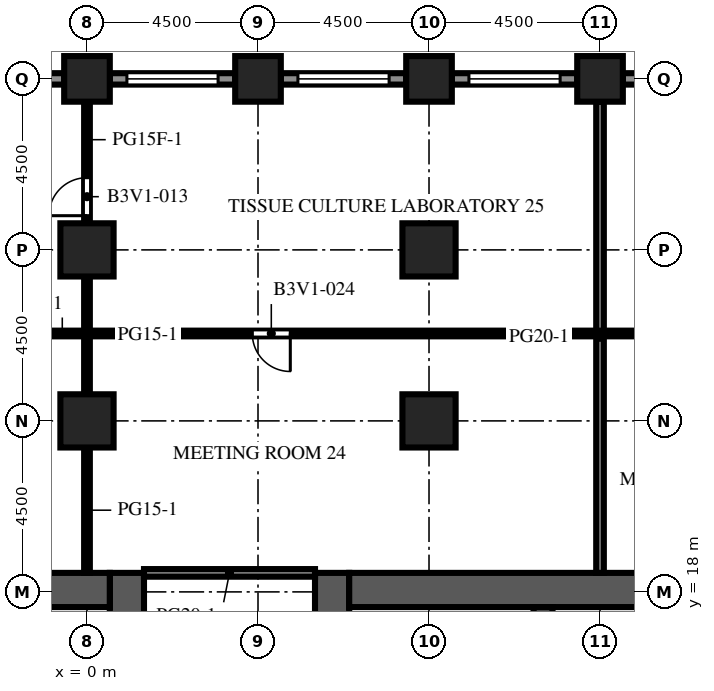
"""IFC4 building model, lengths in metres.
Left out: names, types, materials, properties, quantities, classifications, styles, units other than length and angle.
Written with IfcOpenShell. Run it as: python <this file> out.ifc"""

import sys

from ifc_helpers import new_model, si_unit, direction, frame, frame_2d, origin, origin_2d, place, context, subcontext, project, spatial, rectangle, extrude, element, fill, save


model = new_model("IFC4")
c1 = context("Model", 3, precision=1e-05, world=origin(), true_north=direction((0.0, 1.0)))
c2 = subcontext(c1, "Body", "Model", "MODEL_VIEW")
j1 = project(units=[si_unit("LENGTHUNIT", "METRE"), si_unit("PLANEANGLEUNIT", "RADIAN")], contexts=[c1])
p1 = place(None, origin())
s1 = spatial("IfcSite", under=j1, at=p1, CompositionType="ELEMENT")
p2 = place(p1, origin())
s2 = spatial("IfcBuilding", under=s1, at=p2, CompositionType="ELEMENT")
p3 = place(p2, frame((0.0, 0.0, 94.3)))
s3 = spatial("IfcBuildingStorey", under=s2, at=p3, CompositionType="ELEMENT", Elevation=94.3)
for number, where, z_axis, x_axis in (
    (1, (0.0, 31.5, 0.0), (0.0, 0.0, 1.0), (1.0, 0.0, 0.0)),
    (2, (4.5, 31.5, 0.0), (0.0, 0.0, 1.0), (1.0, 0.0, 0.0)),
    (3, (9.0, 31.5, 0.0), (0.0, 0.0, 1.0), (1.0, 0.0, 0.0)),
    (4, (13.5, 31.5, 0.0), (0.0, 0.0, 1.0), (1.0, 0.0, 0.0)),
):
    element("IfcColumn", number, at=place(p3, frame(where, z_axis=z_axis, x_axis=x_axis)), inside=s3, PredefinedType="COLUMN", context=c2, shape_type="SweptSolid", body=[
        extrude(rectangle(XDim=1.2, YDim=1.2, at=origin_2d()), origin(), (0.0, 0.0, 1.0), 4.1),
    ])
for number, where, z_axis, x_axis in (
    (5, (0.0, 22.5, 0.0), (0.0, 0.0, 1.0), (1.0, 0.0, 0.0)),
    (6, (0.0, 27.0, 0.0), (0.0, 0.0, 1.0), (1.0, 0.0, 0.0)),
    (7, (9.0, 22.5, 0.0), (0.0, 0.0, 1.0), (1.0, 0.0, 0.0)),
    (8, (9.0, 27.0, 0.0), (0.0, 0.0, 1.0), (1.0, 0.0, 0.0)),
):
    element("IfcColumn", number, at=place(p3, frame(where, z_axis=z_axis, x_axis=x_axis)), inside=s3, PredefinedType="COLUMN", context=c2, shape_type="SweptSolid", body=[
        extrude(rectangle(XDim=1.4, YDim=1.4, at=origin_2d()), origin(), (0.0, 0.0, 1.0), 4.1),
    ])
p4 = place(p3, frame((1.05, -9.0, 0.0), z_axis=(0.0, 0.0, 1.0), x_axis=(0.0, 1.0, 0.0)))
e9 = element("IfcWall", 9, at=p4, inside=s3, PredefinedType="SHEAR", context=c2, shape_type="SweptSolid", body=[
    extrude(rectangle(XDim=27.5, YDim=0.9, at=frame_2d((13.75, 0.0))), origin(), (0.0, 0.0, 1.0), 4.1),
])
p5 = place(p4, frame((12.55, 0.0, 0.0)))
e10 = element("IfcOpeningElement", 10, at=p5, cuts=e9, PredefinedType="OPENING", context=c2, shape_type="SweptSolid", body=[
    extrude(rectangle(XDim=2.4, YDim=2.4, at=frame_2d((1.2, 1.2))), frame((0.0, 0.46, 0.0), z_axis=(0.0, -1.0, 0.0), x_axis=(1.0, 0.0, 0.0)), (0.0, 0.0, 1.0), 0.92),
])
p6 = place(p4, frame((3.975, 0.0, 0.0)))
e11 = element("IfcOpeningElement", 11, at=p6, cuts=e9, PredefinedType="OPENING", context=c2, shape_type="SweptSolid", body=[
    extrude(rectangle(XDim=1.2, YDim=2.1, at=frame_2d((0.6, 1.05))), frame((0.0, 0.46, 0.0), z_axis=(0.0, -1.0, 0.0), x_axis=(1.0, 0.0, 0.0)), (0.0, 0.0, 1.0), 0.92),
])
p7 = place(p4, frame((22.325, 0.0, 0.0)))
e12 = element("IfcOpeningElement", 12, at=p7, cuts=e9, PredefinedType="OPENING", context=c2, shape_type="SweptSolid", body=[
    extrude(rectangle(XDim=1.2, YDim=2.1, at=frame_2d((0.6, 1.05))), frame((0.0, 0.46, 0.0), z_axis=(0.0, -1.0, 0.0), x_axis=(1.0, 0.0, 0.0)), (0.0, 0.0, 1.0), 0.92),
])
p8 = place(p3, frame((-9.6, 18.05, 0.0), z_axis=(0.0, 0.0, 1.0), x_axis=(1.0, 0.0, 0.0)))
e13 = element("IfcWall", 13, at=p8, inside=s3, PredefinedType="SHEAR", context=c2, shape_type="SweptSolid", body=[
    extrude(rectangle(XDim=10.2, YDim=0.9, at=frame_2d((5.1, 0.0))), origin(), (0.0, 0.0, 1.0), 4.1),
])
p9 = place(p3, frame((6.45, -9.0, 0.0), z_axis=(0.0, 0.0, 1.0), x_axis=(0.0, 1.0, 0.0)))
e14 = element("IfcWall", 14, at=p9, inside=s3, PredefinedType="SHEAR", context=c2, shape_type="SweptSolid", body=[
    extrude(rectangle(XDim=27.5, YDim=0.9, at=frame_2d((13.75, 0.0))), origin(), (0.0, 0.0, 1.0), 4.1),
])
p10 = place(p9, frame((12.55, 0.0, 0.0)))
e15 = element("IfcOpeningElement", 15, at=p10, cuts=e14, PredefinedType="OPENING", context=c2, shape_type="SweptSolid", body=[
    extrude(rectangle(XDim=2.4, YDim=2.4, at=frame_2d((1.2, 1.2))), frame((0.0, 0.46, 0.0), z_axis=(0.0, -1.0, 0.0), x_axis=(1.0, 0.0, 0.0)), (0.0, 0.0, 1.0), 0.92),
])
p11 = place(p9, frame((3.975, 0.0, 0.0)))
e16 = element("IfcOpeningElement", 16, at=p11, cuts=e14, PredefinedType="OPENING", context=c2, shape_type="SweptSolid", body=[
    extrude(rectangle(XDim=1.2, YDim=2.1, at=frame_2d((0.6, 1.05))), frame((0.0, 0.46, 0.0), z_axis=(0.0, -1.0, 0.0), x_axis=(1.0, 0.0, 0.0)), (0.0, 0.0, 1.0), 0.92),
])
p12 = place(p9, frame((22.325, 0.0, 0.0)))
e17 = element("IfcOpeningElement", 17, at=p12, cuts=e14, PredefinedType="OPENING", context=c2, shape_type="SweptSolid", body=[
    extrude(rectangle(XDim=1.2, YDim=2.1, at=frame_2d((0.6, 1.05))), frame((0.0, 0.46, 0.0), z_axis=(0.0, -1.0, 0.0), x_axis=(1.0, 0.0, 0.0)), (0.0, 0.0, 1.0), 0.92),
])
p13 = place(p3, frame((6.9, 18.05, 0.0), z_axis=(0.0, 0.0, 1.0), x_axis=(1.0, 0.0, 0.0)))
e18 = element("IfcWall", 18, at=p13, inside=s3, PredefinedType="SHEAR", context=c2, shape_type="SweptSolid", body=[
    extrude(rectangle(XDim=10.2, YDim=0.9, at=frame_2d((5.1, 0.0))), origin(), (0.0, 0.0, 1.0), 4.1),
])
p14 = place(p3, frame((12.0, 10.25, 0.0), z_axis=(0.0, 0.0, 1.0), x_axis=(0.0, 1.0, 0.0)))
e19 = element("IfcWall", 19, at=p14, inside=s3, PredefinedType="SHEAR", context=c2, shape_type="SweptSolid", body=[
    extrude(rectangle(XDim=7.35, YDim=0.5, at=frame_2d((3.675, 0.0))), origin(), (0.0, 0.0, 1.0), 4.1),
])
p15 = place(p3, frame((14.1, 31.5, 0.0), z_axis=(0.0, 0.0, 1.0), x_axis=(1.0, 0.0, 0.0)))
e20 = element("IfcWall", 20, at=p15, inside=s3, PredefinedType="SOLIDWALL", context=c2, shape_type="SweptSolid", body=[
    extrude(rectangle(XDim=3.3, YDim=0.3, at=frame_2d((1.65, 0.0))), origin(), (0.0, 0.0, 1.0), 2.75),
])
p16 = place(p15, frame((0.45, 0.0, 0.8)))
e21 = element("IfcOpeningElement", 21, at=p16, cuts=e20, PredefinedType="OPENING", context=c2, shape_type="SweptSolid", body=[
    extrude(rectangle(XDim=2.4, YDim=1.7, at=frame_2d((1.2, 0.85))), frame((0.0, 0.16, 0.0), z_axis=(0.0, -1.0, 0.0), x_axis=(1.0, 0.0, 0.0)), (0.0, 0.0, 1.0), 0.32),
])
p17 = place(p3, frame((9.6, 31.5, 0.0), z_axis=(0.0, 0.0, 1.0), x_axis=(1.0, 0.0, 0.0)))
e22 = element("IfcWall", 22, at=p17, inside=s3, PredefinedType="SOLIDWALL", context=c2, shape_type="SweptSolid", body=[
    extrude(rectangle(XDim=3.3, YDim=0.3, at=frame_2d((1.65, 0.0))), origin(), (0.0, 0.0, 1.0), 2.75),
])
p18 = place(p17, frame((0.45, 0.0, 0.8)))
e23 = element("IfcOpeningElement", 23, at=p18, cuts=e22, PredefinedType="OPENING", context=c2, shape_type="SweptSolid", body=[
    extrude(rectangle(XDim=2.4, YDim=1.7, at=frame_2d((1.2, 0.85))), frame((0.0, 0.16, 0.0), z_axis=(0.0, -1.0, 0.0), x_axis=(1.0, 0.0, 0.0)), (0.0, 0.0, 1.0), 0.32),
])
p19 = place(p3, frame((5.1, 31.5, 0.0), z_axis=(0.0, 0.0, 1.0), x_axis=(1.0, 0.0, 0.0)))
e24 = element("IfcWall", 24, at=p19, inside=s3, PredefinedType="SOLIDWALL", context=c2, shape_type="SweptSolid", body=[
    extrude(rectangle(XDim=3.3, YDim=0.3, at=frame_2d((1.65, 0.0))), origin(), (0.0, 0.0, 1.0), 2.75),
])
p20 = place(p19, frame((0.45, 0.0, 0.8)))
e25 = element("IfcOpeningElement", 25, at=p20, cuts=e24, PredefinedType="OPENING", context=c2, shape_type="SweptSolid", body=[
    extrude(rectangle(XDim=2.4, YDim=1.7, at=frame_2d((1.2, 0.85))), frame((0.0, 0.16, 0.0), z_axis=(0.0, -1.0, 0.0), x_axis=(1.0, 0.0, 0.0)), (0.0, 0.0, 1.0), 0.32),
])
p21 = place(p3, frame((0.6, 31.5, 0.0), z_axis=(0.0, 0.0, 1.0), x_axis=(1.0, 0.0, 0.0)))
e26 = element("IfcWall", 26, at=p21, inside=s3, PredefinedType="SOLIDWALL", context=c2, shape_type="SweptSolid", body=[
    extrude(rectangle(XDim=3.3, YDim=0.3, at=frame_2d((1.65, 0.0))), origin(), (0.0, 0.0, 1.0), 2.75),
])
p22 = place(p21, frame((0.45, 0.0, 0.8)))
e27 = element("IfcOpeningElement", 27, at=p22, cuts=e26, PredefinedType="OPENING", context=c2, shape_type="SweptSolid", body=[
    extrude(rectangle(XDim=2.4, YDim=1.7, at=frame_2d((1.2, 0.85))), frame((0.0, 0.16, 0.0), z_axis=(0.0, -1.0, 0.0), x_axis=(1.0, 0.0, 0.0)), (0.0, 0.0, 1.0), 0.32),
])
p23 = place(p3, frame((-3.9, 31.5, 0.0), z_axis=(0.0, 0.0, 1.0), x_axis=(1.0, 0.0, 0.0)))
e28 = element("IfcWall", 28, at=p23, inside=s3, PredefinedType="SOLIDWALL", context=c2, shape_type="SweptSolid", body=[
    extrude(rectangle(XDim=3.3, YDim=0.3, at=frame_2d((1.65, 0.0))), origin(), (0.0, 0.0, 1.0), 2.75),
])
p24 = place(p23, frame((0.45, 0.0, 0.8)))
e29 = element("IfcOpeningElement", 29, at=p24, cuts=e28, PredefinedType="OPENING", context=c2, shape_type="SweptSolid", body=[
    extrude(rectangle(XDim=2.4, YDim=1.7, at=frame_2d((1.2, 0.85))), frame((0.0, 0.16, 0.0), z_axis=(0.0, -1.0, 0.0), x_axis=(1.0, 0.0, 0.0)), (0.0, 0.0, 1.0), 0.32),
])
p25 = place(p3, frame((-0.8, 14.807, 0.0), z_axis=(0.0, 0.0, 1.0), x_axis=(0.0, 1.0, 0.0)))
e30 = element("IfcWall", 30, at=p25, inside=s3, PredefinedType="PARTITIONING", context=c2, shape_type="SweptSolid", body=[
    extrude(rectangle(XDim=2.793, YDim=0.1, at=frame_2d((1.396, 0.0))), origin(), (0.0, 0.0, 1.0), 3.65),
])
p26 = place(p25, frame((0.896, 0.0, 0.0)))
e31 = element("IfcOpeningElement", 31, at=p26, cuts=e30, PredefinedType="OPENING", context=c2, shape_type="SweptSolid", body=[
    extrude(rectangle(XDim=1.0, YDim=2.1, at=frame_2d((0.5, 1.05))), frame((0.0, 0.06, 0.0), z_axis=(0.0, -1.0, 0.0), x_axis=(1.0, 0.0, 0.0)), (0.0, 0.0, 1.0), 0.12),
])
p27 = place(p3, frame((8.3, 14.807, 0.0), z_axis=(0.0, 0.0, 1.0), x_axis=(0.0, 1.0, 0.0)))
e32 = element("IfcWall", 32, at=p27, inside=s3, PredefinedType="PARTITIONING", context=c2, shape_type="SweptSolid", body=[
    extrude(rectangle(XDim=2.793, YDim=0.1, at=frame_2d((1.396, 0.0))), origin(), (0.0, 0.0, 1.0), 3.65),
])
p28 = place(p27, frame((0.896, 0.0, 0.0)))
e33 = element("IfcOpeningElement", 33, at=p28, cuts=e32, PredefinedType="OPENING", context=c2, shape_type="SweptSolid", body=[
    extrude(rectangle(XDim=1.0, YDim=2.1, at=frame_2d((0.5, 1.05))), frame((0.0, 0.06, 0.0), z_axis=(0.0, -1.0, 0.0), x_axis=(1.0, 0.0, 0.0)), (0.0, 0.0, 1.0), 0.12),
])
p29 = place(p3, frame((0.0, 18.5, 0.0), z_axis=(0.0, 0.0, 1.0), x_axis=(0.0, 1.0, 0.0)))
e34 = element("IfcWall", 34, at=p29, inside=s3, PredefinedType="PARTITIONING", context=c2, shape_type="SweptSolid", body=[
    extrude(rectangle(XDim=3.3, YDim=0.15, at=frame_2d((1.65, 0.0))), origin(), (0.0, 0.0, 1.0), 3.65),
])
p30 = place(p3, frame((0.0, 23.2, 0.0), z_axis=(0.0, 0.0, 1.0), x_axis=(0.0, 1.0, 0.0)))
e35 = element("IfcWall", 35, at=p30, inside=s3, PredefinedType="PARTITIONING", context=c2, shape_type="SweptSolid", body=[
    extrude(rectangle(XDim=3.1, YDim=0.15, at=frame_2d((1.55, 0.0))), origin(), (0.0, 0.0, 1.0), 3.65),
])
p31 = place(p3, frame((0.0, 30.9, 0.0), z_axis=(0.0, 0.0, 1.0), x_axis=(0.0, -1.0, 0.0)))
e36 = element("IfcWall", 36, at=p31, inside=s3, PredefinedType="PARTITIONING", context=c2, shape_type="SweptSolid", body=[
    extrude(rectangle(XDim=3.2, YDim=0.15, at=frame_2d((1.6, 0.0))), origin(), (0.0, 0.0, 1.0), 3.65),
])
p32 = place(p31, frame((2.0, 0.0, 0.0)))
e37 = element("IfcOpeningElement", 37, at=p32, cuts=e36, PredefinedType="OPENING", context=c2, shape_type="SweptSolid", body=[
    extrude(rectangle(XDim=1.0, YDim=2.1, at=frame_2d((0.5, 1.05))), frame((0.0, 0.085, 0.0), z_axis=(0.0, -1.0, 0.0), x_axis=(1.0, 0.0, 0.0)), (0.0, 0.0, 1.0), 0.17),
])
p33 = place(p3, frame((13.5, 18.5, 0.0), z_axis=(0.0, 0.0, 1.0), x_axis=(0.0, 1.0, 0.0)))
e38 = element("IfcWall", 38, at=p33, inside=s3, PredefinedType="PARTITIONING", context=c2, shape_type="SweptSolid", body=[
    extrude(rectangle(XDim=12.4, YDim=0.2, at=frame_2d((6.2, 0.0))), origin(), (0.0, 0.0, 1.0), 3.65),
])
p34 = place(p3, frame((1.5, 18.5, 0.0), z_axis=(0.0, 0.0, 1.0), x_axis=(1.0, 0.0, 0.0)))
e39 = element("IfcWall", 39, at=p34, inside=s3, PredefinedType="PARTITIONING", context=c2, shape_type="SweptSolid", body=[
    extrude(rectangle(XDim=4.5, YDim=0.2, at=frame_2d((2.25, 0.0))), origin(), (0.0, 0.0, 1.0), 3.65),
])
p35 = place(p3, frame((18.0, 24.8, 0.0), z_axis=(0.0, 0.0, 1.0), x_axis=(-1.0, 0.0, 0.0)))
e40 = element("IfcWall", 40, at=p35, inside=s3, PredefinedType="PARTITIONING", context=c2, shape_type="SweptSolid", body=[
    extrude(rectangle(XDim=28.5, YDim=0.15, at=frame_2d((14.25, 0.0))), origin(), (0.0, 0.0, 1.0), 3.65),
])
p36 = place(p35, frame((23.65, 0.0, 0.0)))
e41 = element("IfcOpeningElement", 41, at=p36, cuts=e40, PredefinedType="OPENING", context=c2, shape_type="SweptSolid", body=[
    extrude(rectangle(XDim=1.0, YDim=2.1, at=frame_2d((0.5, 1.05))), frame((0.0, 0.085, 0.0), z_axis=(0.0, -1.0, 0.0), x_axis=(1.0, 0.0, 0.0)), (0.0, 0.0, 1.0), 0.17),
])
p37 = place(p35, frame((12.65, 0.0, 0.0)))
e42 = element("IfcOpeningElement", 42, at=p37, cuts=e40, PredefinedType="OPENING", context=c2, shape_type="SweptSolid", body=[
    extrude(rectangle(XDim=1.0, YDim=2.1, at=frame_2d((0.5, 1.05))), frame((0.0, 0.085, 0.0), z_axis=(0.0, -1.0, 0.0), x_axis=(1.0, 0.0, 0.0)), (0.0, 0.0, 1.0), 0.17),
])
p38 = place(p35, frame((1.9, 0.0, 0.0)))
e43 = element("IfcOpeningElement", 43, at=p38, cuts=e40, PredefinedType="OPENING", context=c2, shape_type="SweptSolid", body=[
    extrude(rectangle(XDim=1.0, YDim=2.1, at=frame_2d((0.5, 1.05))), frame((0.0, 0.085, 0.0), z_axis=(0.0, -1.0, 0.0), x_axis=(1.0, 0.0, 0.0)), (0.0, 0.0, 1.0), 0.17),
])
p39 = place(p18, origin())
e44 = element("IfcWindow", 44, at=p39, inside=s3, PartitioningType="SINGLE_PANEL", PredefinedType="WINDOW", context=c2, shape_type="SweptSolid", body=[
    extrude(rectangle(XDim=2.4, YDim=1.7, at=frame_2d((1.2, 0.85))), frame((0.0, 0.03, 0.0), z_axis=(0.0, -1.0, 0.0), x_axis=(1.0, 0.0, 0.0)), (0.0, 0.0, 1.0), 0.06),
])
fill(e23, e44)
p40 = place(p20, origin())
e45 = element("IfcWindow", 45, at=p40, inside=s3, PartitioningType="SINGLE_PANEL", PredefinedType="WINDOW", context=c2, shape_type="SweptSolid", body=[
    extrude(rectangle(XDim=2.4, YDim=1.7, at=frame_2d((1.2, 0.85))), frame((0.0, 0.03, 0.0), z_axis=(0.0, -1.0, 0.0), x_axis=(1.0, 0.0, 0.0)), (0.0, 0.0, 1.0), 0.06),
])
fill(e25, e45)
p41 = place(p22, origin())
e46 = element("IfcWindow", 46, at=p41, inside=s3, PartitioningType="SINGLE_PANEL", PredefinedType="WINDOW", context=c2, shape_type="SweptSolid", body=[
    extrude(rectangle(XDim=2.4, YDim=1.7, at=frame_2d((1.2, 0.85))), frame((0.0, 0.03, 0.0), z_axis=(0.0, -1.0, 0.0), x_axis=(1.0, 0.0, 0.0)), (0.0, 0.0, 1.0), 0.06),
])
fill(e27, e46)
p42 = place(p32, origin())
e47 = element("IfcDoor", 47, at=p42, inside=s3, OperationType="SINGLE_SWING_RIGHT", PredefinedType="DOOR", context=c2, shape_type="SweptSolid", body=[
    extrude(rectangle(XDim=1.0, YDim=2.1, at=frame_2d((0.5, 1.05))), frame((0.0, 0.025, 0.0), z_axis=(0.0, -1.0, 0.0), x_axis=(1.0, 0.0, 0.0)), (0.0, 0.0, 1.0), 0.05),
])
fill(e37, e47)
p43 = place(p37, origin())
e48 = element("IfcDoor", 48, at=p43, inside=s3, OperationType="SINGLE_SWING_LEFT", PredefinedType="DOOR", context=c2, shape_type="SweptSolid", body=[
    extrude(rectangle(XDim=1.0, YDim=2.1, at=frame_2d((0.5, 1.05))), frame((0.0, 0.025, 0.0), z_axis=(0.0, -1.0, 0.0), x_axis=(1.0, 0.0, 0.0)), (0.0, 0.0, 1.0), 0.05),
])
fill(e42, e48)
save(model, sys.argv[1])
